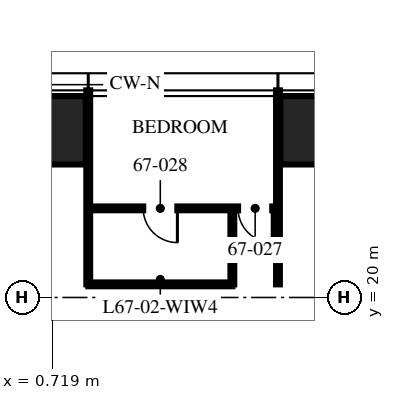
"""IFC4 building model, lengths in metres.
Left out: names, types, materials, properties, quantities, classifications, styles, units other than length and angle.
Written with IfcOpenShell. Run it as: python <this file> out.ifc"""

import sys

from ifc_helpers import new_model, si_unit, direction, frame, frame_2d, origin, origin_2d, place, context, subcontext, project, spatial, rectangle, hollow_rectangle, extrude, element, fill, save


model = new_model("IFC4")
c1 = context("Model", 3, precision=1e-05, world=origin(), true_north=direction((0.0, 1.0)))
c2 = subcontext(c1, "Body", "Model", "MODEL_VIEW")
j1 = project(units=[si_unit("LENGTHUNIT", "METRE"), si_unit("PLANEANGLEUNIT", "RADIAN")], contexts=[c1])
p1 = place(None, origin())
s1 = spatial("IfcSite", under=j1, at=p1, CompositionType="ELEMENT")
p2 = place(p1, origin())
s2 = spatial("IfcBuilding", under=s1, at=p2, CompositionType="ELEMENT")
p3 = place(p2, frame((0.0, 0.0, 267.0)))
s3 = spatial("IfcBuildingStorey", under=s2, at=p3, CompositionType="ELEMENT", Elevation=267.0)
for number, where, z_axis, x_axis in (
    (1, (0.0, 24.4, 0.0), (0.0, 0.0, 1.0), (1.0, 0.0, 0.0)),
    (2, (8.32, 24.4, 0.0), (0.0, 0.0, 1.0), (1.0, 0.0, 0.0)),
):
    element("IfcColumn", number, at=place(p3, frame(where, z_axis=z_axis, x_axis=x_axis)), inside=s3, PredefinedType="COLUMN", context=c2, shape_type="SweptSolid", body=[
        extrude(hollow_rectangle(XDim=3.2, YDim=1.8, WallThickness=0.14, at=origin_2d()), origin(), (0.0, 0.0, 1.0), 3.75),
    ])
for number, where, z_axis, x_axis in (
    (3, (6.656, 20.345, 0.0), (0.0, 0.0, 1.0), (0.0, 1.0, 0.0)),
    (4, (1.664, 20.345, 0.0), (0.0, 0.0, 1.0), (0.0, 1.0, 0.0)),
):
    element("IfcWall", number, at=place(p3, frame(where, z_axis=z_axis, x_axis=x_axis)), inside=s3, PredefinedType="PARTITIONING", context=c2, shape_type="SweptSolid", body=[
        extrude(rectangle(XDim=5.105, YDim=0.1, at=frame_2d((2.552, 0.0))), origin(), (0.0, 0.0, 1.0), 2.91),
    ])
p4 = place(p3, frame((6.656, 22.345, 0.0), z_axis=(0.0, 0.0, 1.0), x_axis=(-1.0, 0.0, 0.0)))
e5 = element("IfcWall", 5, at=p4, inside=s3, PredefinedType="PARTITIONING", context=c2, shape_type="SweptSolid", body=[
    extrude(rectangle(XDim=4.992, YDim=0.1, at=frame_2d((2.496, 0.0))), origin(), (0.0, 0.0, 1.0), 2.81),
])
p5 = place(p4, frame((0.15, 0.0, 0.0)))
e6 = element("IfcOpeningElement", 6, at=p5, cuts=e5, PredefinedType="OPENING", context=c2, shape_type="SweptSolid", body=[
    extrude(rectangle(XDim=0.9, YDim=2.1, at=frame_2d((0.45, 1.05))), frame((0.0, 0.06, 0.0), z_axis=(0.0, -1.0, 0.0), x_axis=(1.0, 0.0, 0.0)), (0.0, 0.0, 1.0), 0.12),
])
p6 = place(p4, frame((2.646, 0.0, 0.0)))
e7 = element("IfcOpeningElement", 7, at=p6, cuts=e5, PredefinedType="OPENING", context=c2, shape_type="SweptSolid", body=[
    extrude(rectangle(XDim=0.9, YDim=2.1, at=frame_2d((0.45, 1.05))), frame((0.0, 0.06, 0.0), z_axis=(0.0, -1.0, 0.0), x_axis=(1.0, 0.0, 0.0)), (0.0, 0.0, 1.0), 0.12),
])
p7 = place(p3, frame((5.456, 20.345, 0.0), z_axis=(0.0, 0.0, 1.0), x_axis=(0.0, 1.0, 0.0)))
e8 = element("IfcWall", 8, at=p7, inside=s3, PredefinedType="PARTITIONING", context=c2, shape_type="SweptSolid", body=[
    extrude(rectangle(XDim=2.0, YDim=0.1, at=frame_2d((1.0, 0.0))), origin(), (0.0, 0.0, 1.0), 3.5),
])
p8 = place(p3, frame((5.456, 20.345, 0.0), z_axis=(0.0, 0.0, 1.0), x_axis=(-1.0, 0.0, 0.0)))
e9 = element("IfcWall", 9, at=p8, inside=s3, PredefinedType="PARTITIONING", context=c2, shape_type="SweptSolid", body=[
    extrude(rectangle(XDim=3.792, YDim=0.1, at=frame_2d((1.896, 0.0))), origin(), (0.0, 0.0, 1.0), 2.81),
])
p9 = place(p5, origin())
e10 = element("IfcDoor", 10, at=p9, inside=s3, OperationType="SINGLE_SWING_LEFT", PredefinedType="DOOR", context=c2, shape_type="SweptSolid", body=[
    extrude(rectangle(XDim=0.9, YDim=2.1, at=frame_2d((0.45, 1.05))), frame((0.0, 0.025, 0.0), z_axis=(0.0, -1.0, 0.0), x_axis=(1.0, 0.0, 0.0)), (0.0, 0.0, 1.0), 0.05),
])
fill(e6, e10)
p10 = place(p6, origin())
e11 = element("IfcDoor", 11, at=p10, inside=s3, OperationType="SINGLE_SWING_LEFT", PredefinedType="DOOR", context=c2, shape_type="SweptSolid", body=[
    extrude(rectangle(XDim=0.9, YDim=2.1, at=frame_2d((0.45, 1.05))), frame((0.0, 0.025, 0.0), z_axis=(0.0, -1.0, 0.0), x_axis=(1.0, 0.0, 0.0)), (0.0, 0.0, 1.0), 0.05),
])
fill(e7, e11)
save(model, sys.argv[1])
